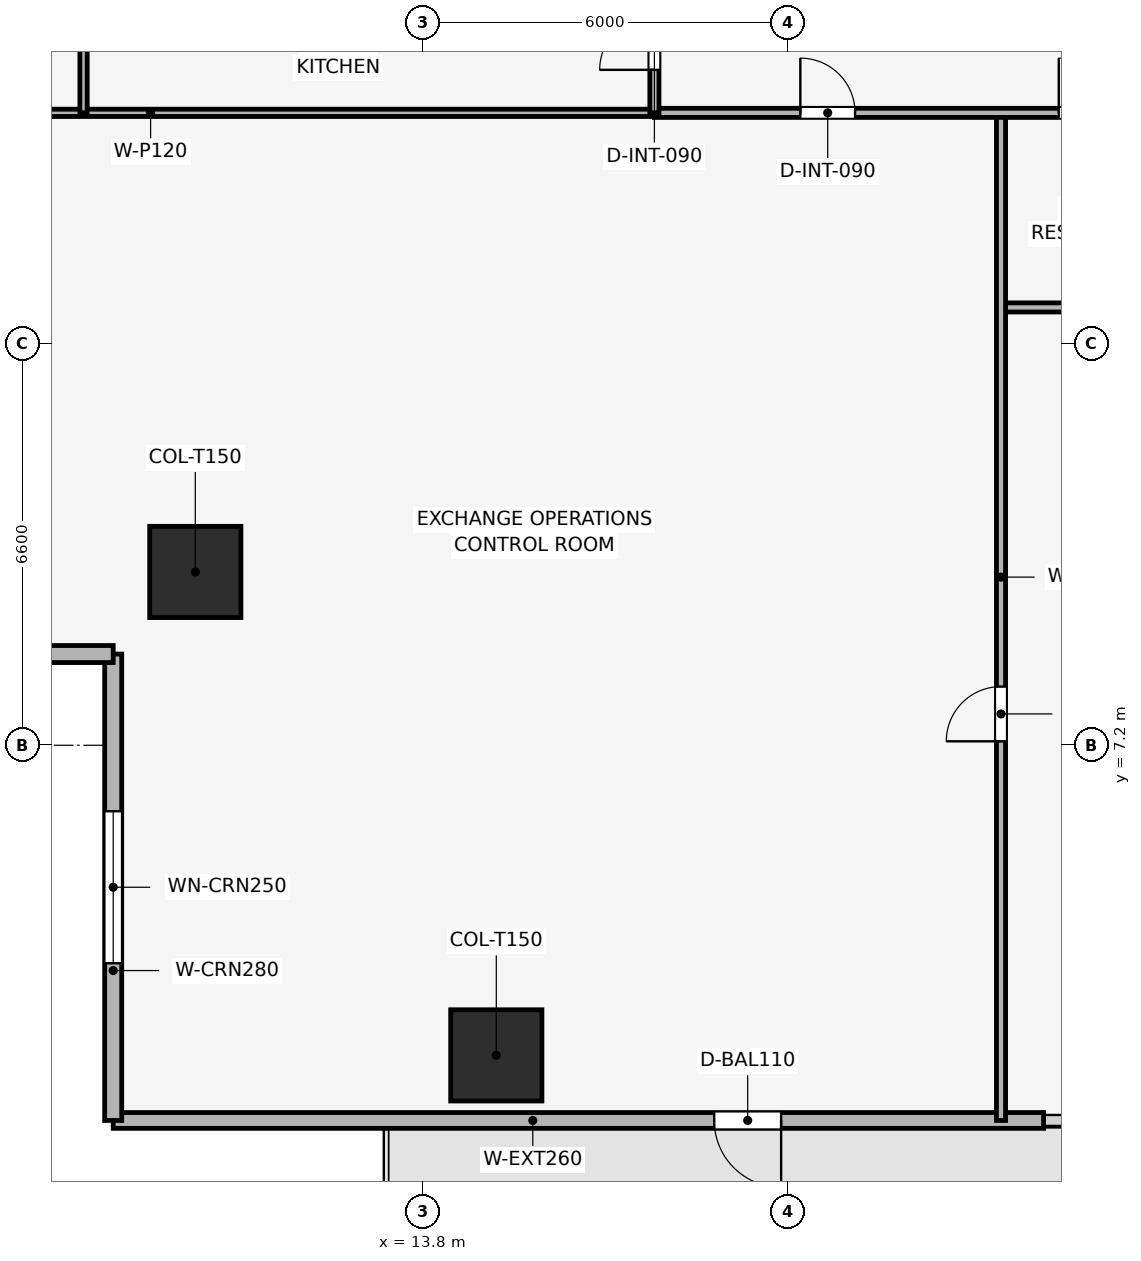
"""IFC4 building model, lengths in metres.
Left out: names, types, materials, properties, quantities, classifications, styles, units other than length and angle.
Written with IfcOpenShell. Run it as: python <this file> out.ifc"""

import sys

from ifc_helpers import new_model, si_unit, direction, frame, frame_2d, origin, origin_2d, place, context, subcontext, project, spatial, rectangle, extrude, element, fill, save


model = new_model("IFC4")
c1 = context("Model", 3, precision=1e-05, world=origin(), true_north=direction((0.0, 1.0)))
c2 = subcontext(c1, "Body", "Model", "MODEL_VIEW")
j1 = project(units=[si_unit("LENGTHUNIT", "METRE"), si_unit("PLANEANGLEUNIT", "RADIAN")], contexts=[c1])
p1 = place(None, origin())
s1 = spatial("IfcSite", under=j1, at=p1, CompositionType="ELEMENT")
p2 = place(p1, origin())
s2 = spatial("IfcBuilding", under=s1, at=p2, CompositionType="ELEMENT")
p3 = place(p2, frame((0.0, 0.0, 53.4)))
s3 = spatial("IfcBuildingStorey", under=s2, at=p3, CompositionType="ELEMENT", Elevation=53.4)
for number, where, z_axis, x_axis in (
    (1, (15.0, 2.1, 0.003), (0.0, 0.0, 1.0), (1.0, 0.0, 0.0)),
    (2, (10.05, 10.05, 0.003), (0.0, 0.0, 1.0), (1.0, 0.0, 0.0)),
):
    element("IfcColumn", number, at=place(p3, frame(where, z_axis=z_axis, x_axis=x_axis)), inside=s3, PredefinedType="COLUMN", context=c2, shape_type="SweptSolid", body=[
        extrude(rectangle(XDim=1.5, YDim=1.5, at=origin_2d()), origin(), (0.0, 0.0, 1.0), 3.644),
    ])
p4 = place(p3, frame((24.0, 1.03, 0.0), z_axis=(0.0, 0.0, 1.0), x_axis=(-1.0, 0.0, 0.0)))
e3 = element("IfcWall", 3, at=p4, inside=s3, PredefinedType="SOLIDWALL", context=c2, shape_type="SweptSolid", body=[
    extrude(rectangle(XDim=15.3, YDim=0.26, at=frame_2d((7.65, 0.0))), origin(), (0.0, 0.0, 1.0), 3.65),
])
p5 = place(p4, frame((4.316, 0.0, 0.0)))
e4 = element("IfcOpeningElement", 4, at=p5, cuts=e3, PredefinedType="OPENING", context=c2, shape_type="SweptSolid", body=[
    extrude(rectangle(XDim=1.1, YDim=2.2, at=frame_2d((0.55, 1.1))), frame((0.0, 0.14, 0.0), z_axis=(0.0, -1.0, 0.0), x_axis=(1.0, 0.0, 0.0)), (0.0, 0.0, 1.0), 0.28),
])
p6 = place(p3, frame((8.7, 1.03, 0.0), z_axis=(0.0, 0.0, 1.0), x_axis=(0.0, 1.0, 0.0)))
e5 = element("IfcWall", 5, at=p6, inside=s3, PredefinedType="SOLIDWALL", context=c2, shape_type="SweptSolid", body=[
    extrude(rectangle(XDim=7.67, YDim=0.28, at=frame_2d((3.835, 0.0))), origin(), (0.0, 0.0, 1.0), 3.65),
])
p7 = place(p6, frame((2.585, 0.0, 0.9)))
e6 = element("IfcOpeningElement", 6, at=p7, cuts=e5, PredefinedType="OPENING", context=c2, shape_type="SweptSolid", body=[
    extrude(rectangle(XDim=2.5, YDim=1.9, at=frame_2d((1.25, 0.95))), frame((0.0, 0.15, 0.0), z_axis=(0.0, -1.0, 0.0), x_axis=(1.0, 0.0, 0.0)), (0.0, 0.0, 1.0), 0.3),
])
p8 = place(p3, frame((8.7, 8.7, 0.0), z_axis=(0.0, 0.0, 1.0), x_axis=(-1.0, 0.0, 0.0)))
e7 = element("IfcWall", 7, at=p8, inside=s3, PredefinedType="SOLIDWALL", context=c2, shape_type="SweptSolid", body=[
    extrude(rectangle(XDim=7.67, YDim=0.28, at=frame_2d((3.835, 0.0))), origin(), (0.0, 0.0, 1.0), 3.65),
])
p9 = place(p8, frame((2.585, 0.0, 0.9)))
e8 = element("IfcOpeningElement", 8, at=p9, cuts=e7, PredefinedType="OPENING", context=c2, shape_type="SweptSolid", body=[
    extrude(rectangle(XDim=2.5, YDim=1.9, at=frame_2d((1.25, 0.95))), frame((0.0, 0.15, 0.0), z_axis=(0.0, -1.0, 0.0), x_axis=(1.0, 0.0, 0.0)), (0.0, 0.0, 1.0), 0.3),
])
p10 = place(p3, frame((23.3, 14.4, 0.0), z_axis=(0.0, 0.0, 1.0), x_axis=(1.0, 0.0, 0.0)))
e9 = element("IfcWall", 9, at=p10, inside=s3, PredefinedType="PARTITIONING", context=c2, shape_type="SweptSolid", body=[
    extrude(rectangle(XDim=8.4, YDim=0.15, at=frame_2d((4.2, 0.0))), origin(), (0.0, 0.0, 1.0), 3.085),
])
p11 = place(p3, frame((23.3, 1.03, 0.0), z_axis=(0.0, 0.0, 1.0), x_axis=(0.0, 1.0, 0.0)))
e10 = element("IfcWall", 10, at=p11, inside=s3, PredefinedType="PARTITIONING", context=c2, shape_type="SweptSolid", body=[
    extrude(rectangle(XDim=16.57, YDim=0.15, at=frame_2d((8.285, 0.0))), origin(), (0.0, 0.0, 1.0), 2.935),
])
p12 = place(p11, frame((6.235, 0.0, 0.0)))
e11 = element("IfcOpeningElement", 11, at=p12, cuts=e10, PredefinedType="OPENING", context=c2, shape_type="SweptSolid", body=[
    extrude(rectangle(XDim=0.9, YDim=2.1, at=frame_2d((0.45, 1.05))), frame((0.0, 0.085, 0.0), z_axis=(0.0, -1.0, 0.0), x_axis=(1.0, 0.0, 0.0)), (0.0, 0.0, 1.0), 0.17),
])
p13 = place(p3, frame((1.03, 17.6, 0.0), z_axis=(0.0, 0.0, 1.0), x_axis=(1.0, 0.0, 0.0)))
e12 = element("IfcWall", 12, at=p13, inside=s3, PredefinedType="PARTITIONING", context=c2, shape_type="SweptSolid", body=[
    extrude(rectangle(XDim=16.57, YDim=0.12, at=frame_2d((8.285, 0.0))), origin(), (0.0, 0.0, 1.0), 2.935),
])
p14 = place(p3, frame((8.212, 17.6, 0.0), z_axis=(0.0, 0.0, 1.0), x_axis=(0.0, 1.0, 0.0)))
e13 = element("IfcWall", 13, at=p14, inside=s3, PredefinedType="PARTITIONING", context=c2, shape_type="SweptSolid", body=[
    extrude(rectangle(XDim=2.313, YDim=0.12, at=frame_2d((1.156, 0.0))), origin(), (0.0, 0.0, 1.0), 3.65),
])
p15 = place(p14, frame((1.213, 0.0, 0.0)))
e14 = element("IfcOpeningElement", 14, at=p15, cuts=e13, PredefinedType="OPENING", context=c2, shape_type="SweptSolid", body=[
    extrude(rectangle(XDim=0.9, YDim=2.1, at=frame_2d((0.45, 1.05))), frame((0.0, 0.07, 0.0), z_axis=(0.0, -1.0, 0.0), x_axis=(1.0, 0.0, 0.0)), (0.0, 0.0, 1.0), 0.14),
])
p16 = place(p3, frame((17.6, 17.6, 0.0), z_axis=(0.0, 0.0, 1.0), x_axis=(1.0, 0.0, 0.0)))
e15 = element("IfcWall", 15, at=p16, inside=s3, PredefinedType="PARTITIONING", context=c2, shape_type="SweptSolid", body=[
    extrude(rectangle(XDim=22.4, YDim=0.15, at=frame_2d((11.2, 0.0))), origin(), (0.0, 0.0, 1.0), 3.085),
])
p17 = place(p16, frame((2.4, 0.0, 0.0)))
e16 = element("IfcOpeningElement", 16, at=p17, cuts=e15, PredefinedType="OPENING", context=c2, shape_type="SweptSolid", body=[
    extrude(rectangle(XDim=0.9, YDim=2.1, at=frame_2d((0.45, 1.05))), frame((0.0, 0.085, 0.0), z_axis=(0.0, -1.0, 0.0), x_axis=(1.0, 0.0, 0.0)), (0.0, 0.0, 1.0), 0.17),
])
p18 = place(p16, frame((6.65, 0.0, 0.0)))
e17 = element("IfcOpeningElement", 17, at=p18, cuts=e15, PredefinedType="OPENING", context=c2, shape_type="SweptSolid", body=[
    extrude(rectangle(XDim=0.9, YDim=2.1, at=frame_2d((0.45, 1.05))), frame((0.0, 0.085, 0.0), z_axis=(0.0, -1.0, 0.0), x_axis=(1.0, 0.0, 0.0)), (0.0, 0.0, 1.0), 0.17),
])
p19 = place(p16, frame((9.55, 0.0, 0.0)))
e18 = element("IfcOpeningElement", 18, at=p19, cuts=e15, PredefinedType="OPENING", context=c2, shape_type="SweptSolid", body=[
    extrude(rectangle(XDim=0.9, YDim=2.1, at=frame_2d((0.45, 1.05))), frame((0.0, 0.085, 0.0), z_axis=(0.0, -1.0, 0.0), x_axis=(1.0, 0.0, 0.0)), (0.0, 0.0, 1.0), 0.17),
])
p20 = place(p16, frame((12.3, 0.0, 0.0)))
e19 = element("IfcOpeningElement", 19, at=p20, cuts=e15, PredefinedType="OPENING", context=c2, shape_type="SweptSolid", body=[
    extrude(rectangle(XDim=0.95, YDim=2.1, at=frame_2d((0.475, 1.05))), frame((0.0, 0.085, 0.0), z_axis=(0.0, -1.0, 0.0), x_axis=(1.0, 0.0, 0.0)), (0.0, 0.0, 1.0), 0.17),
])
p21 = place(p16, frame((17.8, 0.0, 0.0)))
e20 = element("IfcOpeningElement", 20, at=p21, cuts=e15, PredefinedType="OPENING", context=c2, shape_type="SweptSolid", body=[
    extrude(rectangle(XDim=0.9, YDim=2.1, at=frame_2d((0.45, 1.05))), frame((0.0, 0.085, 0.0), z_axis=(0.0, -1.0, 0.0), x_axis=(1.0, 0.0, 0.0)), (0.0, 0.0, 1.0), 0.17),
])
p22 = place(p3, frame((17.6, 17.6, 0.0), z_axis=(0.0, 0.0, 1.0), x_axis=(0.0, 1.0, 0.0)))
e21 = element("IfcWall", 21, at=p22, inside=s3, PredefinedType="PARTITIONING", context=c2, shape_type="SweptSolid", body=[
    extrude(rectangle(XDim=22.4, YDim=0.15, at=frame_2d((11.2, 0.0))), origin(), (0.0, 0.0, 1.0), 3.085),
])
p23 = place(p22, frame((0.707, 0.0, 0.0)))
e22 = element("IfcOpeningElement", 22, at=p23, cuts=e21, PredefinedType="OPENING", context=c2, shape_type="SweptSolid", body=[
    extrude(rectangle(XDim=0.9, YDim=2.1, at=frame_2d((0.45, 1.05))), frame((0.0, 0.085, 0.0), z_axis=(0.0, -1.0, 0.0), x_axis=(1.0, 0.0, 0.0)), (0.0, 0.0, 1.0), 0.17),
])
p24 = place(p22, frame((4.745, 0.0, 0.0)))
e23 = element("IfcOpeningElement", 23, at=p24, cuts=e21, PredefinedType="OPENING", context=c2, shape_type="SweptSolid", body=[
    extrude(rectangle(XDim=0.9, YDim=2.1, at=frame_2d((0.45, 1.05))), frame((0.0, 0.085, 0.0), z_axis=(0.0, -1.0, 0.0), x_axis=(1.0, 0.0, 0.0)), (0.0, 0.0, 1.0), 0.17),
])
p25 = place(p22, frame((10.769, 0.0, 0.0)))
e24 = element("IfcOpeningElement", 24, at=p25, cuts=e21, PredefinedType="OPENING", context=c2, shape_type="SweptSolid", body=[
    extrude(rectangle(XDim=0.9, YDim=2.1, at=frame_2d((0.45, 1.05))), frame((0.0, 0.085, 0.0), z_axis=(0.0, -1.0, 0.0), x_axis=(1.0, 0.0, 0.0)), (0.0, 0.0, 1.0), 0.17),
])
p26 = place(p22, frame((17.931, 0.0, 0.0)))
e25 = element("IfcOpeningElement", 25, at=p26, cuts=e21, PredefinedType="OPENING", context=c2, shape_type="SweptSolid", body=[
    extrude(rectangle(XDim=0.9, YDim=2.1, at=frame_2d((0.45, 1.05))), frame((0.0, 0.085, 0.0), z_axis=(0.0, -1.0, 0.0), x_axis=(1.0, 0.0, 0.0)), (0.0, 0.0, 1.0), 0.17),
])
p27 = place(p5, origin())
e26 = element("IfcDoor", 26, at=p27, inside=s3, OperationType="SINGLE_SWING_LEFT", PredefinedType="DOOR", context=c2, shape_type="SweptSolid", body=[
    extrude(rectangle(XDim=1.1, YDim=2.2, at=frame_2d((0.55, 1.1))), frame((0.0, 0.025, 0.0), z_axis=(0.0, -1.0, 0.0), x_axis=(1.0, 0.0, 0.0)), (0.0, 0.0, 1.0), 0.05),
])
fill(e4, e26)
p28 = place(p7, origin())
e27 = element("IfcWindow", 27, at=p28, inside=s3, PartitioningType="SINGLE_PANEL", PredefinedType="WINDOW", context=c2, shape_type="SweptSolid", body=[
    extrude(rectangle(XDim=2.5, YDim=1.9, at=frame_2d((1.25, 0.95))), frame((0.0, 0.03, 0.0), z_axis=(0.0, -1.0, 0.0), x_axis=(1.0, 0.0, 0.0)), (0.0, 0.0, 1.0), 0.06),
])
fill(e6, e27)
p29 = place(p12, origin())
e28 = element("IfcDoor", 28, at=p29, inside=s3, OperationType="SINGLE_SWING_LEFT", PredefinedType="DOOR", context=c2, shape_type="SweptSolid", body=[
    extrude(rectangle(XDim=0.9, YDim=2.1, at=frame_2d((0.45, 1.05))), frame((0.0, 0.025, 0.0), z_axis=(0.0, -1.0, 0.0), x_axis=(1.0, 0.0, 0.0)), (0.0, 0.0, 1.0), 0.05),
])
fill(e11, e28)
p30 = place(p17, origin())
e29 = element("IfcDoor", 29, at=p30, inside=s3, OperationType="SINGLE_SWING_LEFT", PredefinedType="DOOR", context=c2, shape_type="SweptSolid", body=[
    extrude(rectangle(XDim=0.9, YDim=2.1, at=frame_2d((0.45, 1.05))), frame((0.0, 0.025, 0.0), z_axis=(0.0, -1.0, 0.0), x_axis=(1.0, 0.0, 0.0)), (0.0, 0.0, 1.0), 0.05),
])
fill(e16, e29)
p31 = place(p18, origin())
e30 = element("IfcDoor", 30, at=p31, inside=s3, OperationType="SINGLE_SWING_LEFT", PredefinedType="DOOR", context=c2, shape_type="SweptSolid", body=[
    extrude(rectangle(XDim=0.9, YDim=2.1, at=frame_2d((0.45, 1.05))), frame((0.0, 0.025, 0.0), z_axis=(0.0, -1.0, 0.0), x_axis=(1.0, 0.0, 0.0)), (0.0, 0.0, 1.0), 0.05),
])
fill(e17, e30)
p32 = place(p23, origin())
e31 = element("IfcDoor", 31, at=p32, inside=s3, OperationType="SINGLE_SWING_LEFT", PredefinedType="DOOR", context=c2, shape_type="SweptSolid", body=[
    extrude(rectangle(XDim=0.9, YDim=2.1, at=frame_2d((0.45, 1.05))), frame((0.0, 0.025, 0.0), z_axis=(0.0, -1.0, 0.0), x_axis=(1.0, 0.0, 0.0)), (0.0, 0.0, 1.0), 0.05),
])
fill(e22, e31)
save(model, sys.argv[1])
